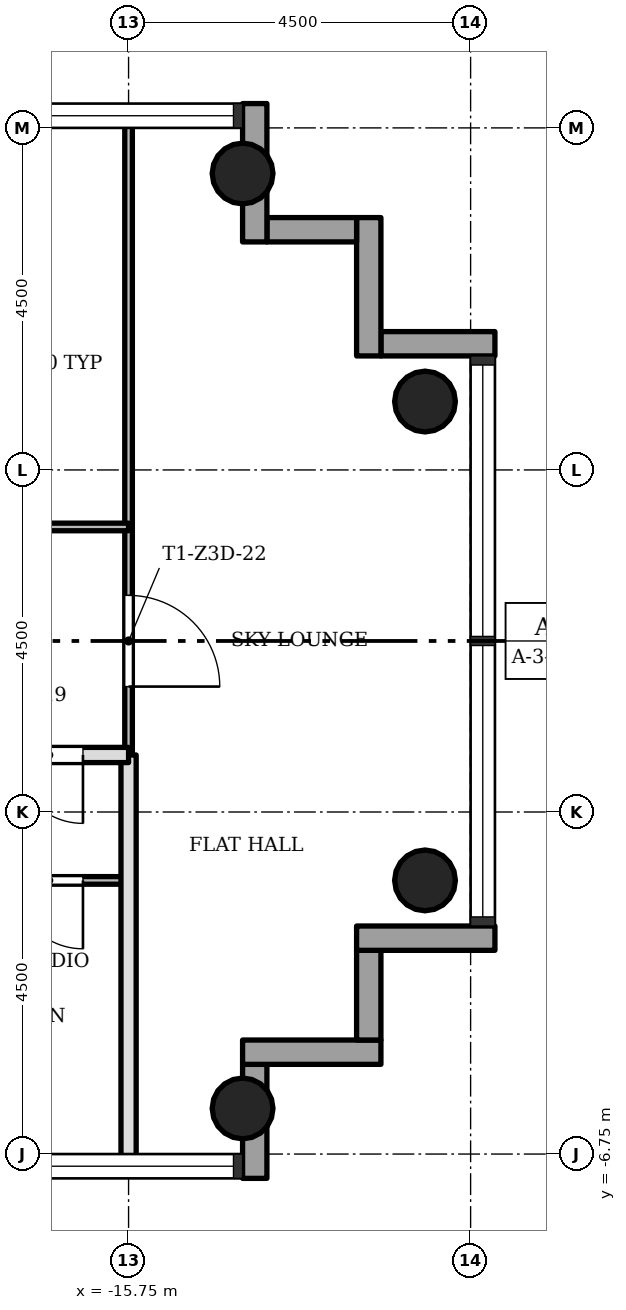
"""IFC4 building model, lengths in metres.
Left out: names, types, materials, properties, quantities, classifications, styles, units other than length and angle.
Written with IfcOpenShell. Run it as: python <this file> out.ifc"""

import sys

from ifc_helpers import new_model, si_unit, direction, frame, frame_2d, origin, origin_2d, place, context, subcontext, project, spatial, rectangle, hollow_circle, extrude, element, fill, save


model = new_model("IFC4")
c1 = context("Model", 3, precision=1e-05, world=origin(), true_north=direction((0.0, 1.0)))
c2 = subcontext(c1, "Body", "Model", "MODEL_VIEW")
j1 = project(units=[si_unit("LENGTHUNIT", "METRE"), si_unit("PLANEANGLEUNIT", "RADIAN")], contexts=[c1])
p1 = place(None, origin())
s1 = spatial("IfcSite", under=j1, at=p1, CompositionType="ELEMENT")
p2 = place(p1, origin())
s2 = spatial("IfcBuilding", under=s1, at=p2, CompositionType="ELEMENT")
p3 = place(p2, frame((0.0, 0.0, 174.5)))
s3 = spatial("IfcBuildingStorey", under=s2, at=p3, CompositionType="ELEMENT", Elevation=174.5)
for number, where, z_axis, x_axis in (
    (1, (-14.25, -6.15, 0.0), (0.0, 0.0, 1.0), (1.0, 0.0, 0.0)),
    (2, (-14.25, 6.15, 0.0), (0.0, 0.0, 1.0), (1.0, 0.0, 0.0)),
    (3, (-11.85, -3.15, 0.0), (0.0, 0.0, 1.0), (1.0, 0.0, 0.0)),
    (4, (-11.85, 3.15, 0.0), (0.0, 0.0, 1.0), (1.0, 0.0, 0.0)),
):
    element("IfcColumn", number, at=place(p3, frame(where, z_axis=z_axis, x_axis=x_axis)), inside=s3, PredefinedType="COLUMN", context=c2, shape_type="SweptSolid", body=[
        extrude(hollow_circle(Radius=0.4, WallThickness=0.028, at=origin_2d()), origin(), (0.0, 0.0, 1.0), 3.4),
    ])
p4 = place(p3, frame((-14.09, -7.07, -0.3), z_axis=(0.0, 0.0, 1.0), x_axis=(0.0, 1.0, 0.0)))
e5 = element("IfcWall", 5, at=p4, inside=s3, PredefinedType="STANDARD", context=c2, shape_type="SweptSolid", body=[
    extrude(rectangle(XDim=1.5, YDim=0.32, at=frame_2d((0.75, 0.0))), origin(), (0.0, 0.0, 1.0), 3.4),
])
p5 = place(p3, frame((-14.25, -5.41, -0.3), z_axis=(0.0, 0.0, 1.0), x_axis=(1.0, 0.0, 0.0)))
e6 = element("IfcWall", 6, at=p5, inside=s3, PredefinedType="STANDARD", context=c2, shape_type="SweptSolid", body=[
    extrude(rectangle(XDim=1.82, YDim=0.32, at=frame_2d((0.91, 0.0))), origin(), (0.0, 0.0, 1.0), 3.4),
])
p6 = place(p3, frame((-12.59, -5.25, -0.3), z_axis=(0.0, 0.0, 1.0), x_axis=(0.0, 1.0, 0.0)))
e7 = element("IfcWall", 7, at=p6, inside=s3, PredefinedType="STANDARD", context=c2, shape_type="SweptSolid", body=[
    extrude(rectangle(XDim=1.18, YDim=0.32, at=frame_2d((0.59, 0.0))), origin(), (0.0, 0.0, 1.0), 3.4),
])
p7 = place(p3, frame((-12.75, -3.91, -0.3), z_axis=(0.0, 0.0, 1.0), x_axis=(1.0, 0.0, 0.0)))
e8 = element("IfcWall", 8, at=p7, inside=s3, PredefinedType="STANDARD", context=c2, shape_type="SweptSolid", body=[
    extrude(rectangle(XDim=1.82, YDim=0.32, at=frame_2d((0.91, 0.0))), origin(), (0.0, 0.0, 1.0), 3.4),
])
p8 = place(p3, frame((-10.93, 3.91, -0.3), z_axis=(0.0, 0.0, 1.0), x_axis=(-1.0, 0.0, 0.0)))
e9 = element("IfcWall", 9, at=p8, inside=s3, PredefinedType="STANDARD", context=c2, shape_type="SweptSolid", body=[
    extrude(rectangle(XDim=1.5, YDim=0.32, at=frame_2d((0.75, 0.0))), origin(), (0.0, 0.0, 1.0), 3.4),
])
p9 = place(p3, frame((-12.59, 3.75, -0.3), z_axis=(0.0, 0.0, 1.0), x_axis=(0.0, 1.0, 0.0)))
e10 = element("IfcWall", 10, at=p9, inside=s3, PredefinedType="STANDARD", context=c2, shape_type="SweptSolid", body=[
    extrude(rectangle(XDim=1.82, YDim=0.32, at=frame_2d((0.91, 0.0))), origin(), (0.0, 0.0, 1.0), 3.4),
])
p10 = place(p3, frame((-12.75, 5.41, -0.3), z_axis=(0.0, 0.0, 1.0), x_axis=(-1.0, 0.0, 0.0)))
e11 = element("IfcWall", 11, at=p10, inside=s3, PredefinedType="STANDARD", context=c2, shape_type="SweptSolid", body=[
    extrude(rectangle(XDim=1.18, YDim=0.32, at=frame_2d((0.59, 0.0))), origin(), (0.0, 0.0, 1.0), 3.4),
])
p11 = place(p3, frame((-14.09, 5.25, -0.3), z_axis=(0.0, 0.0, 1.0), x_axis=(0.0, 1.0, 0.0)))
e12 = element("IfcWall", 12, at=p11, inside=s3, PredefinedType="STANDARD", context=c2, shape_type="SweptSolid", body=[
    extrude(rectangle(XDim=1.82, YDim=0.32, at=frame_2d((0.91, 0.0))), origin(), (0.0, 0.0, 1.0), 3.4),
])
p12 = place(p3, frame((-15.75, -1.5, 0.0), z_axis=(0.0, 0.0, 1.0), x_axis=(0.0, 1.0, 0.0)))
e13 = element("IfcWall", 13, at=p12, inside=s3, PredefinedType="PARTITIONING", context=c2, shape_type="SweptSolid", body=[
    extrude(rectangle(XDim=8.35, YDim=0.1, at=frame_2d((4.175, 0.0))), origin(), (0.0, 0.0, 1.0), 3.0),
])
p13 = place(p12, frame((0.9, 0.0, 0.0)))
e14 = element("IfcOpeningElement", 14, at=p13, cuts=e13, PredefinedType="OPENING", context=c2, shape_type="SweptSolid", body=[
    extrude(rectangle(XDim=1.2, YDim=2.1, at=frame_2d((0.6, 1.05))), frame((0.0, 0.06, 0.0), z_axis=(0.0, -1.0, 0.0), x_axis=(1.0, 0.0, 0.0)), (0.0, 0.0, 1.0), 0.12),
])
p14 = place(p3, frame((-15.75, -6.85, 0.0), z_axis=(0.0, 0.0, 1.0), x_axis=(0.0, 1.0, 0.0)))
e15 = element("IfcWall", 15, at=p14, inside=s3, PredefinedType="SOLIDWALL", context=c2, shape_type="SweptSolid", body=[
    extrude(rectangle(XDim=5.35, YDim=0.2, at=frame_2d((2.675, 0.0))), origin(), (0.0, 0.0, 1.0), 3.0),
])
p15 = place(p3, frame((-20.25, -3.15, 0.0), z_axis=(0.0, 0.0, 1.0), x_axis=(1.0, 0.0, 0.0)))
e16 = element("IfcWall", 16, at=p15, inside=s3, PredefinedType="PARTITIONING", context=c2, shape_type="SweptSolid", body=[
    extrude(rectangle(XDim=4.5, YDim=0.1, at=frame_2d((2.25, 0.0))), origin(), (0.0, 0.0, 1.0), 3.0),
])
p16 = place(p15, frame((3.0, 0.0, 0.0)))
e17 = element("IfcOpeningElement", 17, at=p16, cuts=e16, PredefinedType="OPENING", context=c2, shape_type="SweptSolid", body=[
    extrude(rectangle(XDim=0.9, YDim=2.1, at=frame_2d((0.45, 1.05))), frame((0.0, 0.06, 0.0), z_axis=(0.0, -1.0, 0.0), x_axis=(1.0, 0.0, 0.0)), (0.0, 0.0, 1.0), 0.12),
])
p17 = place(p3, frame((-20.25, -1.5, 0.0), z_axis=(0.0, 0.0, 1.0), x_axis=(1.0, 0.0, 0.0)))
e18 = element("IfcWall", 18, at=p17, inside=s3, PredefinedType="SOLIDWALL", context=c2, shape_type="SweptSolid", body=[
    extrude(rectangle(XDim=4.5, YDim=0.2, at=frame_2d((2.25, 0.0))), origin(), (0.0, 0.0, 1.0), 3.0),
])
p18 = place(p17, frame((3.0, 0.0, 0.0)))
e19 = element("IfcOpeningElement", 19, at=p18, cuts=e18, PredefinedType="OPENING", context=c2, shape_type="SweptSolid", body=[
    extrude(rectangle(XDim=0.9, YDim=2.1, at=frame_2d((0.45, 1.05))), frame((0.0, 0.11, 0.0), z_axis=(0.0, -1.0, 0.0), x_axis=(1.0, 0.0, 0.0)), (0.0, 0.0, 1.0), 0.22),
])
p19 = place(p3, frame((-20.25, 1.5, 0.0), z_axis=(0.0, 0.0, 1.0), x_axis=(1.0, 0.0, 0.0)))
e20 = element("IfcWall", 20, at=p19, inside=s3, PredefinedType="PARTITIONING", context=c2, shape_type="SweptSolid", body=[
    extrude(rectangle(XDim=4.5, YDim=0.1, at=frame_2d((2.25, 0.0))), origin(), (0.0, 0.0, 1.0), 3.0),
])
p20 = place(p19, frame((1.8, 0.0, 0.0)))
e21 = element("IfcOpeningElement", 21, at=p20, cuts=e20, PredefinedType="OPENING", context=c2, shape_type="SweptSolid", body=[
    extrude(rectangle(XDim=0.9, YDim=2.1, at=frame_2d((0.45, 1.05))), frame((0.0, 0.06, 0.0), z_axis=(0.0, -1.0, 0.0), x_axis=(1.0, 0.0, 0.0)), (0.0, 0.0, 1.0), 0.12),
])
p21 = place(p18, origin())
e22 = element("IfcDoor", 22, at=p21, inside=s3, OperationType="SINGLE_SWING_RIGHT", PredefinedType="DOOR", context=c2, shape_type="SweptSolid", body=[
    extrude(rectangle(XDim=0.9, YDim=2.1, at=frame_2d((0.45, 1.05))), frame((0.0, 0.025, 0.0), z_axis=(0.0, -1.0, 0.0), x_axis=(1.0, 0.0, 0.0)), (0.0, 0.0, 1.0), 0.05),
])
fill(e19, e22)
p22 = place(p16, origin())
e23 = element("IfcDoor", 23, at=p22, inside=s3, OperationType="SINGLE_SWING_RIGHT", PredefinedType="DOOR", context=c2, shape_type="SweptSolid", body=[
    extrude(rectangle(XDim=0.9, YDim=2.1, at=frame_2d((0.45, 1.05))), frame((0.0, 0.025, 0.0), z_axis=(0.0, -1.0, 0.0), x_axis=(1.0, 0.0, 0.0)), (0.0, 0.0, 1.0), 0.05),
])
fill(e17, e23)
p23 = place(p13, origin())
e24 = element("IfcDoor", 24, at=p23, inside=s3, OperationType="SINGLE_SWING_LEFT", PredefinedType="DOOR", context=c2, shape_type="SweptSolid", body=[
    extrude(rectangle(XDim=1.2, YDim=2.1, at=frame_2d((0.6, 1.05))), frame((0.0, 0.025, 0.0), z_axis=(0.0, -1.0, 0.0), x_axis=(1.0, 0.0, 0.0)), (0.0, 0.0, 1.0), 0.05),
])
fill(e14, e24)
save(model, sys.argv[1])
